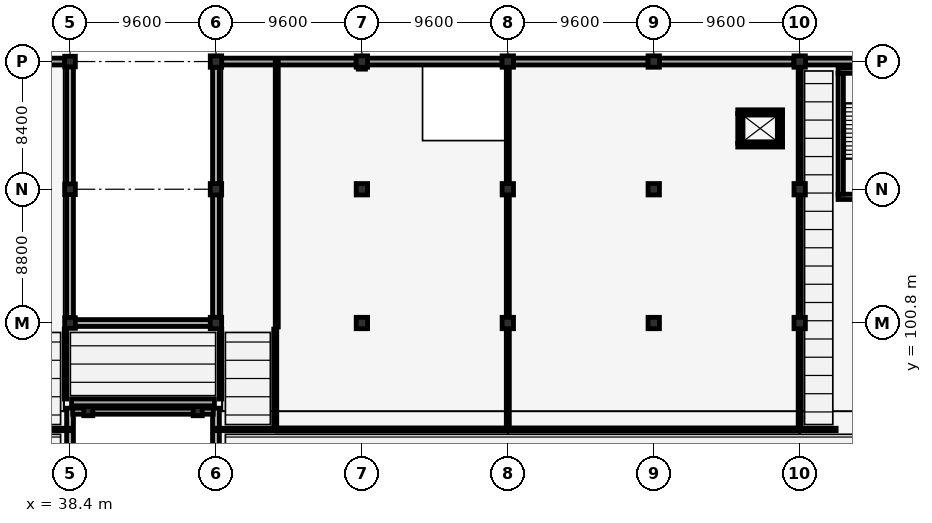
"""IFC4 building model, lengths in metres.
Left out: names, types, materials, properties, quantities, classifications, styles, units other than length and angle.
Written with IfcOpenShell. Run it as: python <this file> out.ifc"""

import sys

from ifc_helpers import new_model, si_unit, direction, frame, frame_2d, origin, origin_2d, place, context, subcontext, project, spatial, rectangle, extrude, element, fill, save


model = new_model("IFC4")
c1 = context("Model", 3, precision=1e-05, world=origin(), true_north=direction((0.0, 1.0)))
c2 = subcontext(c1, "Body", "Model", "MODEL_VIEW")
j1 = project(units=[si_unit("LENGTHUNIT", "METRE"), si_unit("PLANEANGLEUNIT", "RADIAN")], contexts=[c1])
p1 = place(None, origin())
s1 = spatial("IfcSite", under=j1, at=p1, CompositionType="ELEMENT")
p2 = place(p1, origin())
s2 = spatial("IfcBuilding", under=s1, at=p2, CompositionType="ELEMENT")
p3 = place(p2, frame((0.0, 0.0, -4.2)))
s3 = spatial("IfcBuildingStorey", under=s2, at=p3, CompositionType="ELEMENT", Elevation=-4.2)
for number, where, z_axis, x_axis in (
    (1, (38.4, 100.8, 0.0), (0.0, 0.0, 1.0), (1.0, 0.0, 0.0)),
    (2, (38.4, 109.6, 0.0), (0.0, 0.0, 1.0), (1.0, 0.0, 0.0)),
    (3, (38.4, 118.0, 0.0), (0.0, 0.0, 1.0), (1.0, 0.0, 0.0)),
):
    element("IfcColumn", number, at=place(p3, frame(where, z_axis=z_axis, x_axis=x_axis)), inside=s3, PredefinedType="COLUMN", context=c2, shape_type="SweptSolid", body=[
        extrude(rectangle(XDim=0.7, YDim=0.7, at=origin_2d()), origin(), (0.0, 0.0, 1.0), 4.2),
    ])
for number, where, z_axis, x_axis in (
    (4, (48.0, 100.8, 0.0), (0.0, 0.0, 1.0), (1.0, 0.0, 0.0)),
    (5, (48.0, 109.6, 0.0), (0.0, 0.0, 1.0), (1.0, 0.0, 0.0)),
    (6, (48.0, 118.0, 0.0), (0.0, 0.0, 1.0), (1.0, 0.0, 0.0)),
    (7, (57.6, 100.8, 0.0), (0.0, 0.0, 1.0), (1.0, 0.0, 0.0)),
    (8, (57.6, 109.6, 0.0), (0.0, 0.0, 1.0), (1.0, 0.0, 0.0)),
    (9, (57.6, 118.0, 0.0), (0.0, 0.0, 1.0), (1.0, 0.0, 0.0)),
    (10, (67.2, 100.8, 0.0), (0.0, 0.0, 1.0), (1.0, 0.0, 0.0)),
    (11, (67.2, 109.6, 0.0), (0.0, 0.0, 1.0), (1.0, 0.0, 0.0)),
    (12, (67.2, 118.0, 0.0), (0.0, 0.0, 1.0), (1.0, 0.0, 0.0)),
    (13, (76.8, 100.8, 0.0), (0.0, 0.0, 1.0), (1.0, 0.0, 0.0)),
    (14, (76.8, 109.6, 0.0), (0.0, 0.0, 1.0), (1.0, 0.0, 0.0)),
    (15, (76.8, 118.0, 0.0), (0.0, 0.0, 1.0), (1.0, 0.0, 0.0)),
    (16, (86.4, 100.8, 0.0), (0.0, 0.0, 1.0), (1.0, 0.0, 0.0)),
    (17, (86.4, 109.6, 0.0), (0.0, 0.0, 1.0), (1.0, 0.0, 0.0)),
    (18, (86.4, 118.0, 0.0), (0.0, 0.0, 1.0), (1.0, 0.0, 0.0)),
):
    element("IfcColumn", number, at=place(p3, frame(where, z_axis=z_axis, x_axis=x_axis)), inside=s3, PredefinedType="COLUMN", context=c2, shape_type="SweptSolid", body=[
        extrude(rectangle(XDim=0.75, YDim=0.75, at=origin_2d()), origin(), (0.0, 0.0, 1.0), 4.2),
    ])
for number, where, z_axis, x_axis in (
    (19, (39.6, 95.0, 0.0), (0.0, 0.0, 1.0), (1.0, 0.0, 0.0)),
    (20, (46.8, 95.0, 0.0), (0.0, 0.0, 1.0), (1.0, 0.0, 0.0)),
):
    element("IfcColumn", number, at=place(p3, frame(where, z_axis=z_axis, x_axis=x_axis)), inside=s3, PredefinedType="COLUMN", context=c2, shape_type="SweptSolid", body=[
        extrude(rectangle(XDim=0.6, YDim=0.6, at=origin_2d()), origin(), (0.0, 0.0, 1.0), 4.2),
    ])
p4 = place(p3, frame((38.4, 87.467, 0.0), z_axis=(0.0, 0.0, 1.0), x_axis=(0.0, 1.0, 0.0)))
e21 = element("IfcWall", 21, at=p4, inside=s3, PredefinedType="SOLIDWALL", context=c2, shape_type="SweptSolid", body=[
    extrude(rectangle(XDim=7.733, YDim=0.45, at=frame_2d((3.866, 0.0))), origin(), (0.0, 0.0, 1.0), 3.84),
])
for number, where, z_axis, x_axis in (
    (22, (38.4, 101.15, 0.0), (0.0, 0.0, 1.0), (0.0, 1.0, 0.0)),
    (23, (38.4, 109.4, 0.0), (0.0, 0.0, 1.0), (0.0, 1.0, 0.0)),
):
    element("IfcWall", number, at=place(p3, frame(where, z_axis=z_axis, x_axis=x_axis)), inside=s3, PredefinedType="SOLIDWALL", context=c2, shape_type="SweptSolid", body=[
        extrude(rectangle(XDim=8.25, YDim=0.45, at=frame_2d((4.125, 0.0))), origin(), (0.0, 0.0, 1.0), 3.84),
    ])
p5 = place(p3, frame((38.05, 118.0, 0.0), z_axis=(0.0, 0.0, 1.0), x_axis=(-1.0, 0.0, 0.0)))
e24 = element("IfcWall", 24, at=p5, inside=s3, PredefinedType="SOLIDWALL", context=c2, shape_type="SweptSolid", body=[
    extrude(rectangle(XDim=8.9, YDim=0.45, at=frame_2d((4.45, 0.0))), origin(), (0.0, 0.0, 1.0), 3.84),
])
p6 = place(p3, frame((95.625, 118.0, 0.0), z_axis=(0.0, 0.0, 1.0), x_axis=(-1.0, 0.0, 0.0)))
e25 = element("IfcWall", 25, at=p6, inside=s3, PredefinedType="SOLIDWALL", context=c2, shape_type="SweptSolid", body=[
    extrude(rectangle(XDim=8.85, YDim=0.45, at=frame_2d((4.425, 0.0))), origin(), (0.0, 0.0, 1.0), 3.84),
])
p7 = place(p3, frame((86.025, 118.0, 0.0), z_axis=(0.0, 0.0, 1.0), x_axis=(-1.0, 0.0, 0.0)))
e26 = element("IfcWall", 26, at=p7, inside=s3, PredefinedType="SOLIDWALL", context=c2, shape_type="SweptSolid", body=[
    extrude(rectangle(XDim=8.85, YDim=0.45, at=frame_2d((4.425, 0.0))), origin(), (0.0, 0.0, 1.0), 3.84),
])
p8 = place(p3, frame((76.425, 118.0, 0.0), z_axis=(0.0, 0.0, 1.0), x_axis=(-1.0, 0.0, 0.0)))
e27 = element("IfcWall", 27, at=p8, inside=s3, PredefinedType="SOLIDWALL", context=c2, shape_type="SweptSolid", body=[
    extrude(rectangle(XDim=8.85, YDim=0.45, at=frame_2d((4.425, 0.0))), origin(), (0.0, 0.0, 1.0), 3.84),
])
p9 = place(p3, frame((66.825, 118.0, 0.0), z_axis=(0.0, 0.0, 1.0), x_axis=(-1.0, 0.0, 0.0)))
e28 = element("IfcWall", 28, at=p9, inside=s3, PredefinedType="SOLIDWALL", context=c2, shape_type="SweptSolid", body=[
    extrude(rectangle(XDim=8.85, YDim=0.45, at=frame_2d((4.425, 0.0))), origin(), (0.0, 0.0, 1.0), 3.84),
])
p10 = place(p3, frame((57.225, 118.0, 0.0), z_axis=(0.0, 0.0, 1.0), x_axis=(-1.0, 0.0, 0.0)))
e29 = element("IfcWall", 29, at=p10, inside=s3, PredefinedType="SOLIDWALL", context=c2, shape_type="SweptSolid", body=[
    extrude(rectangle(XDim=8.85, YDim=0.45, at=frame_2d((4.425, 0.0))), origin(), (0.0, 0.0, 1.0), 3.84),
])
p11 = place(p3, frame((48.0, 117.625, 0.0), z_axis=(0.0, 0.0, 1.0), x_axis=(0.0, -1.0, 0.0)))
e30 = element("IfcWall", 30, at=p11, inside=s3, PredefinedType="SOLIDWALL", context=c2, shape_type="SweptSolid", body=[
    extrude(rectangle(XDim=8.225, YDim=0.45, at=frame_2d((4.113, 0.0))), origin(), (0.0, 0.0, 1.0), 3.84),
])
p12 = place(p3, frame((48.0, 109.4, 0.0), z_axis=(0.0, 0.0, 1.0), x_axis=(0.0, -1.0, 0.0)))
e31 = element("IfcWall", 31, at=p12, inside=s3, PredefinedType="SOLIDWALL", context=c2, shape_type="SweptSolid", body=[
    extrude(rectangle(XDim=8.225, YDim=0.45, at=frame_2d((4.112, 0.0))), origin(), (0.0, 0.0, 1.0), 3.84),
])
p13 = place(p3, frame((48.0, 95.2, 0.0), z_axis=(0.0, 0.0, 1.0), x_axis=(0.0, -1.0, 0.0)))
e32 = element("IfcWall", 32, at=p13, inside=s3, PredefinedType="SOLIDWALL", context=c2, shape_type="SweptSolid", body=[
    extrude(rectangle(XDim=7.733, YDim=0.45, at=frame_2d((3.866, 0.0))), origin(), (0.0, 0.0, 1.0), 3.84),
])
for number, where, z_axis, x_axis in (
    (33, (38.5, 95.58, 0.0), (0.0, 0.0, 1.0), (1.0, 0.0, 0.0)),
    (34, (38.5, 100.8, 0.0), (0.0, 0.0, 1.0), (1.0, 0.0, 0.0)),
):
    element("IfcWall", number, at=place(p3, frame(where, z_axis=z_axis, x_axis=x_axis)), inside=s3, PredefinedType="SOLIDWALL", context=c2, shape_type="SweptSolid", body=[
        extrude(rectangle(XDim=9.4, YDim=0.45, at=frame_2d((4.7, 0.0))), origin(), (0.0, 0.0, 1.0), 3.84),
    ])
p14 = place(p3, frame((38.575, 95.0, 0.0), z_axis=(0.0, 0.0, 1.0), x_axis=(1.0, 0.0, 0.0)))
e35 = element("IfcWall", 35, at=p14, inside=s3, PredefinedType="SOLIDWALL", context=c2, shape_type="SweptSolid", body=[
    extrude(rectangle(XDim=9.25, YDim=0.4, at=frame_2d((4.625, 0.0))), origin(), (0.0, 0.0, 1.0), 9.0),
])
for number, where, z_axis, x_axis in (
    (36, (94.575, 109.1, 0.0), (0.0, 0.0, 1.0), (-1.0, 0.0, 0.0)),
    (37, (88.925, 117.4, 0.0), (0.0, 0.0, 1.0), (1.0, 0.0, 0.0)),
):
    element("IfcWall", number, at=place(p3, frame(where, z_axis=z_axis, x_axis=x_axis)), inside=s3, PredefinedType="SHEAR", context=c2, shape_type="SweptSolid", body=[
        extrude(rectangle(XDim=5.65, YDim=0.35, at=frame_2d((2.825, 0.0))), origin(), (0.0, 0.0, 1.0), 3.95),
    ])
p15 = place(p3, frame((89.1, 109.275, 0.0), z_axis=(0.0, 0.0, 1.0), x_axis=(0.0, 1.0, 0.0)))
e38 = element("IfcWall", 38, at=p15, inside=s3, PredefinedType="SHEAR", context=c2, shape_type="SweptSolid", body=[
    extrude(rectangle(XDim=7.95, YDim=0.35, at=frame_2d((3.975, 0.0))), origin(), (0.0, 0.0, 1.0), 3.95),
])
p16 = place(p15, frame((0.22, 0.0, 0.0)))
e39 = element("IfcOpeningElement", 39, at=p16, cuts=e38, PredefinedType="OPENING", context=c2, shape_type="SweptSolid", body=[
    extrude(rectangle(XDim=2.05, YDim=2.15, at=frame_2d((1.025, 1.075))), frame((0.0, 0.185, 0.0), z_axis=(0.0, -1.0, 0.0), x_axis=(1.0, 0.0, 0.0)), (0.0, 0.0, 1.0), 0.37),
])
p17 = place(p3, frame((85.275, 112.5, -1.5), z_axis=(0.0, 0.0, 1.0), x_axis=(-1.0, 0.0, 0.0)))
e40 = element("IfcWall", 40, at=p17, inside=s3, PredefinedType="SOLIDWALL", context=c2, shape_type="SweptSolid", body=[
    extrude(rectangle(XDim=2.95, YDim=0.25, at=frame_2d((1.475, 0.0))), origin(), (0.0, 0.0, 1.0), 5.45),
])
p18 = place(p17, frame((0.925, 0.0, 1.5)))
e41 = element("IfcOpeningElement", 41, at=p18, cuts=e40, PredefinedType="OPENING", context=c2, shape_type="SweptSolid", body=[
    extrude(rectangle(XDim=1.1, YDim=2.15, at=frame_2d((0.55, 1.075))), frame((0.0, 0.135, 0.0), z_axis=(0.0, -1.0, 0.0), x_axis=(1.0, 0.0, 0.0)), (0.0, 0.0, 1.0), 0.27),
])
p19 = place(p3, frame((82.325, 114.7, -1.5), z_axis=(0.0, 0.0, 1.0), x_axis=(1.0, 0.0, 0.0)))
e42 = element("IfcWall", 42, at=p19, inside=s3, PredefinedType="SOLIDWALL", context=c2, shape_type="SweptSolid", body=[
    extrude(rectangle(XDim=2.95, YDim=0.25, at=frame_2d((1.475, 0.0))), origin(), (0.0, 0.0, 1.0), 5.45),
])
for number, where, z_axis, x_axis in (
    (43, (82.45, 112.625, -1.5), (0.0, 0.0, 1.0), (0.0, 1.0, 0.0)),
    (44, (85.15, 114.575, -1.5), (0.0, 0.0, 1.0), (0.0, -1.0, 0.0)),
):
    element("IfcWall", number, at=place(p3, frame(where, z_axis=z_axis, x_axis=x_axis)), inside=s3, PredefinedType="SOLIDWALL", context=c2, shape_type="SweptSolid", body=[
        extrude(rectangle(XDim=1.95, YDim=0.25, at=frame_2d((0.975, 0.0))), origin(), (0.0, 0.0, 1.0), 5.45),
    ])
p20 = place(p3, frame((32.0, 93.8, 0.0), z_axis=(0.0, 0.0, 1.0), x_axis=(1.0, 0.0, 0.0)))
e45 = element("IfcWall", 45, at=p20, inside=s3, PredefinedType="PARTITIONING", context=c2, shape_type="SweptSolid", body=[
    extrude(rectangle(XDim=6.35, YDim=0.16, at=frame_2d((3.175, 0.0))), origin(), (0.0, 0.0, 1.0), 3.84),
])
p21 = place(p20, frame((2.275, 0.0, 0.0)))
e46 = element("IfcOpeningElement", 46, at=p21, cuts=e45, PredefinedType="OPENING", context=c2, shape_type="SweptSolid", body=[
    extrude(rectangle(XDim=1.8, YDim=2.15, at=frame_2d((0.9, 1.075))), frame((0.0, 0.09, 0.0), z_axis=(0.0, -1.0, 0.0), x_axis=(1.0, 0.0, 0.0)), (0.0, 0.0, 1.0), 0.18),
])
p22 = place(p3, frame((38.1, 95.8, 0.0), z_axis=(0.0, 0.0, 1.0), x_axis=(0.0, 1.0, 0.0)))
e47 = element("IfcWall", 47, at=p22, inside=s3, PredefinedType="PARTITIONING", context=c2, shape_type="SweptSolid", body=[
    extrude(rectangle(XDim=4.6, YDim=0.16, at=frame_2d((2.3, 0.0))), origin(), (0.0, 0.0, 1.0), 3.84),
])
p23 = place(p22, frame((1.4, 0.0, 0.0)))
e48 = element("IfcOpeningElement", 48, at=p23, cuts=e47, PredefinedType="OPENING", context=c2, shape_type="SweptSolid", body=[
    extrude(rectangle(XDim=1.8, YDim=2.15, at=frame_2d((0.9, 1.075))), frame((0.0, 0.09, 0.0), z_axis=(0.0, -1.0, 0.0), x_axis=(1.0, 0.0, 0.0)), (0.0, 0.0, 1.0), 0.18),
])
p24 = place(p3, frame((48.3, 95.8, 0.0), z_axis=(0.0, 0.0, 1.0), x_axis=(0.0, 1.0, 0.0)))
e49 = element("IfcWall", 49, at=p24, inside=s3, PredefinedType="PARTITIONING", context=c2, shape_type="SweptSolid", body=[
    extrude(rectangle(XDim=4.6, YDim=0.16, at=frame_2d((2.3, 0.0))), origin(), (0.0, 0.0, 1.0), 3.84),
])
p25 = place(p24, frame((1.4, 0.0, 0.0)))
e50 = element("IfcOpeningElement", 50, at=p25, cuts=e49, PredefinedType="OPENING", context=c2, shape_type="SweptSolid", body=[
    extrude(rectangle(XDim=1.8, YDim=2.15, at=frame_2d((0.9, 1.075))), frame((0.0, 0.09, 0.0), z_axis=(0.0, -1.0, 0.0), x_axis=(1.0, 0.0, 0.0)), (0.0, 0.0, 1.0), 0.18),
])
p26 = place(p3, frame((48.05, 93.8, 0.0), z_axis=(0.0, 0.0, 1.0), x_axis=(1.0, 0.0, 0.0)))
e51 = element("IfcWall", 51, at=p26, inside=s3, PredefinedType="PARTITIONING", context=c2, shape_type="SweptSolid", body=[
    extrude(rectangle(XDim=3.75, YDim=0.16, at=frame_2d((1.875, 0.0))), origin(), (0.0, 0.0, 1.0), 3.84),
])
p27 = place(p26, frame((0.975, 0.0, 0.0)))
e52 = element("IfcOpeningElement", 52, at=p27, cuts=e51, PredefinedType="OPENING", context=c2, shape_type="SweptSolid", body=[
    extrude(rectangle(XDim=1.8, YDim=2.15, at=frame_2d((0.9, 1.075))), frame((0.0, 0.09, 0.0), z_axis=(0.0, -1.0, 0.0), x_axis=(1.0, 0.0, 0.0)), (0.0, 0.0, 1.0), 0.18),
])
p28 = place(p3, frame((51.9, 93.9, 0.0), z_axis=(0.0, 0.0, 1.0), x_axis=(0.0, 1.0, 0.0)))
e53 = element("IfcWall", 53, at=p28, inside=s3, PredefinedType="PARTITIONING", context=c2, shape_type="SweptSolid", body=[
    extrude(rectangle(XDim=6.5, YDim=0.2, at=frame_2d((3.25, 0.0))), origin(), (0.0, 0.0, 1.0), 3.84),
])
p29 = place(p28, frame((2.45, 0.0, 0.0)))
e54 = element("IfcOpeningElement", 54, at=p29, cuts=e53, PredefinedType="OPENING", context=c2, shape_type="SweptSolid", body=[
    extrude(rectangle(XDim=1.6, YDim=2.2, at=frame_2d((0.8, 1.1))), frame((0.0, 0.11, 0.0), z_axis=(0.0, -1.0, 0.0), x_axis=(1.0, 0.0, 0.0)), (0.0, 0.0, 1.0), 0.22),
])
p30 = place(p3, frame((86.5, 93.8, 0.0), z_axis=(0.0, 0.0, 1.0), x_axis=(1.0, 0.0, 0.0)))
e55 = element("IfcWall", 55, at=p30, inside=s3, PredefinedType="PARTITIONING", context=c2, shape_type="SweptSolid", body=[
    extrude(rectangle(XDim=2.3, YDim=0.16, at=frame_2d((1.15, 0.0))), origin(), (0.0, 0.0, 1.0), 3.84),
])
p31 = place(p30, frame((0.25, 0.0, 0.0)))
e56 = element("IfcOpeningElement", 56, at=p31, cuts=e55, PredefinedType="OPENING", context=c2, shape_type="SweptSolid", body=[
    extrude(rectangle(XDim=1.8, YDim=2.15, at=frame_2d((0.9, 1.075))), frame((0.0, 0.09, 0.0), z_axis=(0.0, -1.0, 0.0), x_axis=(1.0, 0.0, 0.0)), (0.0, 0.0, 1.0), 0.18),
])
p32 = place(p3, frame((52.0, 93.8, 0.0), z_axis=(0.0, 0.0, 1.0), x_axis=(1.0, 0.0, 0.0)))
e57 = element("IfcWall", 57, at=p32, inside=s3, PredefinedType="PARTITIONING", context=c2, shape_type="SweptSolid", body=[
    extrude(rectangle(XDim=15.1, YDim=0.2, at=frame_2d((7.55, 0.0))), origin(), (0.0, 0.0, 1.0), 3.84),
])
p33 = place(p32, frame((6.75, 0.0, 0.0)))
e58 = element("IfcOpeningElement", 58, at=p33, cuts=e57, PredefinedType="OPENING", context=c2, shape_type="SweptSolid", body=[
    extrude(rectangle(XDim=1.6, YDim=2.2, at=frame_2d((0.8, 1.1))), frame((0.0, 0.11, 0.0), z_axis=(0.0, -1.0, 0.0), x_axis=(1.0, 0.0, 0.0)), (0.0, 0.0, 1.0), 0.22),
])
p34 = place(p3, frame((67.3, 93.8, 0.0), z_axis=(0.0, 0.0, 1.0), x_axis=(1.0, 0.0, 0.0)))
e59 = element("IfcWall", 59, at=p34, inside=s3, PredefinedType="PARTITIONING", context=c2, shape_type="SweptSolid", body=[
    extrude(rectangle(XDim=19.0, YDim=0.2, at=frame_2d((9.5, 0.0))), origin(), (0.0, 0.0, 1.0), 3.84),
])
p35 = place(p34, frame((8.7, 0.0, 0.0)))
e60 = element("IfcOpeningElement", 60, at=p35, cuts=e59, PredefinedType="OPENING", context=c2, shape_type="SweptSolid", body=[
    extrude(rectangle(XDim=1.6, YDim=2.2, at=frame_2d((0.8, 1.1))), frame((0.0, 0.11, 0.0), z_axis=(0.0, -1.0, 0.0), x_axis=(1.0, 0.0, 0.0)), (0.0, 0.0, 1.0), 0.22),
])
p36 = place(p3, frame((86.4, 93.9, 0.0), z_axis=(0.0, 0.0, 1.0), x_axis=(0.0, 1.0, 0.0)))
e61 = element("IfcWall", 61, at=p36, inside=s3, PredefinedType="PARTITIONING", context=c2, shape_type="SweptSolid", body=[
    extrude(rectangle(XDim=24.05, YDim=0.2, at=frame_2d((12.025, 0.0))), origin(), (0.0, 0.0, 1.0), 3.295),
])
p37 = place(p36, frame((11.225, 0.0, 0.0)))
e62 = element("IfcOpeningElement", 62, at=p37, cuts=e61, PredefinedType="OPENING", context=c2, shape_type="SweptSolid", body=[
    extrude(rectangle(XDim=1.6, YDim=2.2, at=frame_2d((0.8, 1.1))), frame((0.0, 0.11, 0.0), z_axis=(0.0, -1.0, 0.0), x_axis=(1.0, 0.0, 0.0)), (0.0, 0.0, 1.0), 0.22),
])
p38 = place(p3, frame((67.2, 93.9, 0.0), z_axis=(0.0, 0.0, 1.0), x_axis=(0.0, 1.0, 0.0)))
e63 = element("IfcWall", 63, at=p38, inside=s3, PredefinedType="PARTITIONING", context=c2, shape_type="SweptSolid", body=[
    extrude(rectangle(XDim=24.05, YDim=0.2, at=frame_2d((12.025, 0.0))), origin(), (0.0, 0.0, 1.0), 3.255),
])
p39 = place(p3, frame((57.365, 117.6, 0.0), z_axis=(0.0, 0.0, 1.0), x_axis=(1.0, 0.0, 0.0)))
e64 = element("IfcWall", 64, at=p39, inside=s3, PredefinedType="PARTITIONING", context=c2, shape_type="SweptSolid", body=[
    extrude(rectangle(XDim=0.47, YDim=0.2, at=frame_2d((0.235, 0.0))), origin(), (0.0, 0.0, 1.0), 3.84),
])
p40 = place(p3, frame((52.0, 100.54, 0.0), z_axis=(0.0, 0.0, 1.0), x_axis=(0.0, 1.0, 0.0)))
e65 = element("IfcWall", 65, at=p40, inside=s3, PredefinedType="PARTITIONING", context=c2, shape_type="SweptSolid", body=[
    extrude(rectangle(XDim=17.41, YDim=0.2, at=frame_2d((8.705, 0.0))), origin(), (0.0, 0.0, 1.0), 3.84),
])
p41 = place(p16, origin())
e66 = element("IfcDoor", 66, at=p41, inside=s3, OperationType="DOUBLE_DOOR_SINGLE_SWING", PredefinedType="DOOR", context=c2, shape_type="SweptSolid", body=[
    extrude(rectangle(XDim=2.05, YDim=2.15, at=frame_2d((1.025, 1.075))), frame((0.0, 0.025, 0.0), z_axis=(0.0, -1.0, 0.0), x_axis=(1.0, 0.0, 0.0)), (0.0, 0.0, 1.0), 0.05),
])
fill(e39, e66)
p42 = place(p18, origin())
e67 = element("IfcDoor", 67, at=p42, inside=s3, OperationType="DOUBLE_DOOR_SLIDING", PredefinedType="DOOR", context=c2, shape_type="SweptSolid", body=[
    extrude(rectangle(XDim=1.1, YDim=2.15, at=frame_2d((0.55, 1.075))), frame((0.0, 0.025, 0.0), z_axis=(0.0, -1.0, 0.0), x_axis=(1.0, 0.0, 0.0)), (0.0, 0.0, 1.0), 0.05),
])
fill(e41, e67)
p43 = place(p23, origin())
e68 = element("IfcDoor", 68, at=p43, inside=s3, OperationType="DOUBLE_DOOR_SINGLE_SWING", PredefinedType="DOOR", context=c2, shape_type="SweptSolid", body=[
    extrude(rectangle(XDim=1.8, YDim=2.15, at=frame_2d((0.9, 1.075))), frame((0.0, 0.025, 0.0), z_axis=(0.0, -1.0, 0.0), x_axis=(1.0, 0.0, 0.0)), (0.0, 0.0, 1.0), 0.05),
])
fill(e48, e68)
p44 = place(p25, origin())
e69 = element("IfcDoor", 69, at=p44, inside=s3, OperationType="DOUBLE_DOOR_SINGLE_SWING", PredefinedType="DOOR", context=c2, shape_type="SweptSolid", body=[
    extrude(rectangle(XDim=1.8, YDim=2.15, at=frame_2d((0.9, 1.075))), frame((0.0, 0.025, 0.0), z_axis=(0.0, -1.0, 0.0), x_axis=(1.0, 0.0, 0.0)), (0.0, 0.0, 1.0), 0.05),
])
fill(e50, e69)
p45 = place(p27, origin())
e70 = element("IfcDoor", 70, at=p45, inside=s3, OperationType="DOUBLE_DOOR_SINGLE_SWING", PredefinedType="DOOR", context=c2, shape_type="SweptSolid", body=[
    extrude(rectangle(XDim=1.8, YDim=2.15, at=frame_2d((0.9, 1.075))), frame((0.0, 0.025, 0.0), z_axis=(0.0, -1.0, 0.0), x_axis=(1.0, 0.0, 0.0)), (0.0, 0.0, 1.0), 0.05),
])
fill(e52, e70)
p46 = place(p29, origin())
e71 = element("IfcDoor", 71, at=p46, inside=s3, OperationType="DOUBLE_DOOR_SINGLE_SWING", PredefinedType="DOOR", context=c2, shape_type="SweptSolid", body=[
    extrude(rectangle(XDim=1.6, YDim=2.2, at=frame_2d((0.8, 1.1))), frame((0.0, 0.025, 0.0), z_axis=(0.0, -1.0, 0.0), x_axis=(1.0, 0.0, 0.0)), (0.0, 0.0, 1.0), 0.05),
])
fill(e54, e71)
p47 = place(p31, origin())
e72 = element("IfcDoor", 72, at=p47, inside=s3, OperationType="DOUBLE_DOOR_SINGLE_SWING", PredefinedType="DOOR", context=c2, shape_type="SweptSolid", body=[
    extrude(rectangle(XDim=1.8, YDim=2.15, at=frame_2d((0.9, 1.075))), frame((0.0, 0.025, 0.0), z_axis=(0.0, -1.0, 0.0), x_axis=(1.0, 0.0, 0.0)), (0.0, 0.0, 1.0), 0.05),
])
fill(e56, e72)
p48 = place(p33, origin())
e73 = element("IfcDoor", 73, at=p48, inside=s3, OperationType="DOUBLE_DOOR_SINGLE_SWING", PredefinedType="DOOR", context=c2, shape_type="SweptSolid", body=[
    extrude(rectangle(XDim=1.6, YDim=2.2, at=frame_2d((0.8, 1.1))), frame((0.0, 0.025, 0.0), z_axis=(0.0, -1.0, 0.0), x_axis=(1.0, 0.0, 0.0)), (0.0, 0.0, 1.0), 0.05),
])
fill(e58, e73)
p49 = place(p35, origin())
e74 = element("IfcDoor", 74, at=p49, inside=s3, OperationType="DOUBLE_DOOR_SINGLE_SWING", PredefinedType="DOOR", context=c2, shape_type="SweptSolid", body=[
    extrude(rectangle(XDim=1.6, YDim=2.2, at=frame_2d((0.8, 1.1))), frame((0.0, 0.025, 0.0), z_axis=(0.0, -1.0, 0.0), x_axis=(1.0, 0.0, 0.0)), (0.0, 0.0, 1.0), 0.05),
])
fill(e60, e74)
p50 = place(p37, origin())
e75 = element("IfcDoor", 75, at=p50, inside=s3, OperationType="DOUBLE_DOOR_SINGLE_SWING", PredefinedType="DOOR", context=c2, shape_type="SweptSolid", body=[
    extrude(rectangle(XDim=1.6, YDim=2.2, at=frame_2d((0.8, 1.1))), frame((0.0, 0.025, 0.0), z_axis=(0.0, -1.0, 0.0), x_axis=(1.0, 0.0, 0.0)), (0.0, 0.0, 1.0), 0.05),
])
fill(e62, e75)
save(model, sys.argv[1])
